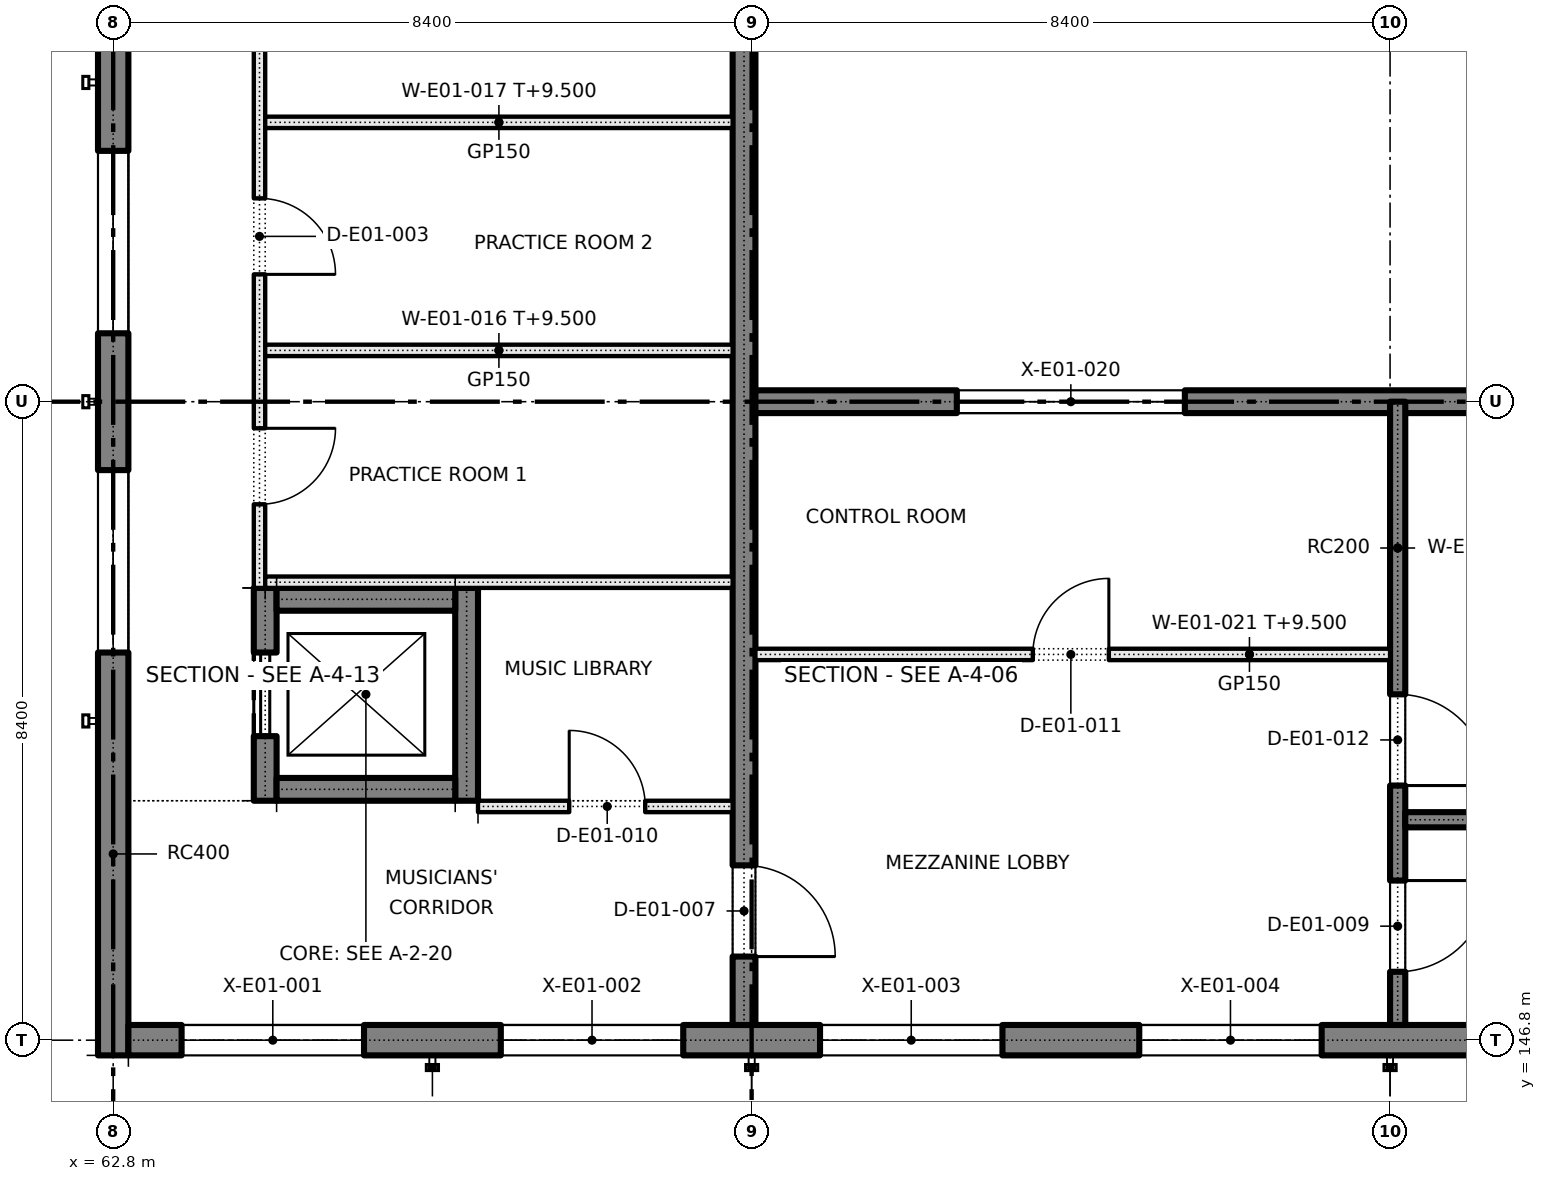
"""IFC4 building model, lengths in metres.
Left out: names, types, materials, properties, quantities, classifications, styles, units other than length and angle.
Written with IfcOpenShell. Run it as: python <this file> out.ifc"""

import sys

from ifc_helpers import new_model, si_unit, direction, frame, frame_2d, origin, place, context, subcontext, project, spatial, polyline, rectangle, outline, extrude, element, fill, save


model = new_model("IFC4")
c1 = context("Model", 3, precision=1e-05, world=origin(), true_north=direction((0.0, 1.0)))
c2 = subcontext(c1, "Body", "Model", "MODEL_VIEW")
j1 = project(units=[si_unit("LENGTHUNIT", "METRE"), si_unit("PLANEANGLEUNIT", "RADIAN")], contexts=[c1])
p1 = place(None, origin())
s1 = spatial("IfcSite", under=j1, at=p1, CompositionType="ELEMENT")
p2 = place(p1, origin())
s2 = spatial("IfcBuilding", under=s1, at=p2, CompositionType="ELEMENT")
p3 = place(p2, frame((0.0, 0.0, 5.4)))
s3 = spatial("IfcBuildingStorey", under=s2, at=p3, CompositionType="ELEMENT", Elevation=5.4)
p4 = place(p3, frame((62.8, 146.6, 0.0), z_axis=(0.0, 0.0, 1.0), x_axis=(0.0, 1.0, 0.0)))
e1 = element("IfcWall", 1, at=p4, inside=s3, PredefinedType="SOLIDWALL", context=c2, shape_type="SweptSolid", body=[
    extrude(rectangle(XDim=25.6, YDim=0.4, at=frame_2d((12.8, 0.0))), origin(), (0.0, 0.0, 1.0), 4.1),
])
p5 = place(p4, frame((5.3, 0.0, 0.9)))
e2 = element("IfcOpeningElement", 2, at=p5, cuts=e1, PredefinedType="OPENING", context=c2, shape_type="SweptSolid", body=[
    extrude(rectangle(XDim=2.4, YDim=2.4, at=frame_2d((1.2, 1.2))), frame((0.0, 0.21, 0.0), z_axis=(0.0, -1.0, 0.0), x_axis=(1.0, 0.0, 0.0)), (0.0, 0.0, 1.0), 0.42),
])
p6 = place(p4, frame((9.5, 0.0, 0.9)))
e3 = element("IfcOpeningElement", 3, at=p6, cuts=e1, PredefinedType="OPENING", context=c2, shape_type="SweptSolid", body=[
    extrude(rectangle(XDim=2.4, YDim=2.4, at=frame_2d((1.2, 1.2))), frame((0.0, 0.21, 0.0), z_axis=(0.0, -1.0, 0.0), x_axis=(1.0, 0.0, 0.0)), (0.0, 0.0, 1.0), 0.42),
])
p7 = place(p4, frame((13.7, 0.0, 0.9)))
e4 = element("IfcOpeningElement", 4, at=p7, cuts=e1, PredefinedType="OPENING", context=c2, shape_type="SweptSolid", body=[
    extrude(rectangle(XDim=2.4, YDim=2.4, at=frame_2d((1.2, 1.2))), frame((0.0, 0.21, 0.0), z_axis=(0.0, -1.0, 0.0), x_axis=(1.0, 0.0, 0.0)), (0.0, 0.0, 1.0), 0.42),
])
p8 = place(p4, frame((17.9, 0.0, 0.9)))
e5 = element("IfcOpeningElement", 5, at=p8, cuts=e1, PredefinedType="OPENING", context=c2, shape_type="SweptSolid", body=[
    extrude(rectangle(XDim=2.4, YDim=2.4, at=frame_2d((1.2, 1.2))), frame((0.0, 0.21, 0.0), z_axis=(0.0, -1.0, 0.0), x_axis=(1.0, 0.0, 0.0)), (0.0, 0.0, 1.0), 0.42),
])
p9 = place(p3, frame((63.0, 146.8, 0.0), z_axis=(0.0, 0.0, 1.0), x_axis=(1.0, 0.0, 0.0)))
e6 = element("IfcWall", 6, at=p9, inside=s3, PredefinedType="SOLIDWALL", context=c2, shape_type="SweptSolid", body=[
    extrude(outline(polyline([(0.0, 0.0), (24.8, 0.0), (24.8, 4.166), (22.802, 4.935), (20.721, 5.574), (18.641, 6.063), (16.561, 6.407), (14.48, 6.612), (12.4, 6.68), (10.32, 6.612), (8.239, 6.407), (6.159, 6.063), (4.079, 5.574), (1.998, 4.935), (0.0, 4.166), (0.0, 0.0)])), frame((0.0, 0.2, 0.0), z_axis=(0.0, -1.0, 0.0), x_axis=(1.0, 0.0, 0.0)), (0.0, 0.0, 1.0), 0.4),
])
p10 = place(p9, frame((0.7, 0.0, 0.9)))
e7 = element("IfcOpeningElement", 7, at=p10, cuts=e6, PredefinedType="OPENING", context=c2, shape_type="SweptSolid", body=[
    extrude(rectangle(XDim=2.4, YDim=2.4, at=frame_2d((1.2, 1.2))), frame((0.0, 0.21, 0.0), z_axis=(0.0, -1.0, 0.0), x_axis=(1.0, 0.0, 0.0)), (0.0, 0.0, 1.0), 0.42),
])
p11 = place(p9, frame((4.9, 0.0, 0.9)))
e8 = element("IfcOpeningElement", 8, at=p11, cuts=e6, PredefinedType="OPENING", context=c2, shape_type="SweptSolid", body=[
    extrude(rectangle(XDim=2.4, YDim=2.4, at=frame_2d((1.2, 1.2))), frame((0.0, 0.21, 0.0), z_axis=(0.0, -1.0, 0.0), x_axis=(1.0, 0.0, 0.0)), (0.0, 0.0, 1.0), 0.42),
])
p12 = place(p9, frame((9.1, 0.0, 0.9)))
e9 = element("IfcOpeningElement", 9, at=p12, cuts=e6, PredefinedType="OPENING", context=c2, shape_type="SweptSolid", body=[
    extrude(rectangle(XDim=2.4, YDim=2.4, at=frame_2d((1.2, 1.2))), frame((0.0, 0.21, 0.0), z_axis=(0.0, -1.0, 0.0), x_axis=(1.0, 0.0, 0.0)), (0.0, 0.0, 1.0), 0.42),
])
p13 = place(p9, frame((13.3, 0.0, 0.9)))
e10 = element("IfcOpeningElement", 10, at=p13, cuts=e6, PredefinedType="OPENING", context=c2, shape_type="SweptSolid", body=[
    extrude(rectangle(XDim=2.4, YDim=2.4, at=frame_2d((1.2, 1.2))), frame((0.0, 0.21, 0.0), z_axis=(0.0, -1.0, 0.0), x_axis=(1.0, 0.0, 0.0)), (0.0, 0.0, 1.0), 0.42),
])
p14 = place(p3, frame((71.1, 147.0, 0.0), z_axis=(0.0, 0.0, 1.0), x_axis=(0.0, 1.0, 0.0)))
e11 = element("IfcWall", 11, at=p14, inside=s3, PredefinedType="SOLIDWALL", context=c2, shape_type="SweptSolid", body=[
    extrude(rectangle(XDim=24.8, YDim=0.3, at=frame_2d((12.4, 0.0))), origin(), (0.0, 0.0, 1.0), 4.1),
])
p15 = place(p14, frame((0.9, 0.0, 0.0)))
e12 = element("IfcOpeningElement", 12, at=p15, cuts=e11, PredefinedType="OPENING", context=c2, shape_type="SweptSolid", body=[
    extrude(rectangle(XDim=1.2, YDim=2.1, at=frame_2d((0.6, 1.05))), frame((0.0, 0.16, 0.0), z_axis=(0.0, -1.0, 0.0), x_axis=(1.0, 0.0, 0.0)), (0.0, 0.0, 1.0), 0.32),
])
p16 = place(p3, frame((71.25, 155.2, 0.0), z_axis=(0.0, 0.0, 1.0), x_axis=(1.0, 0.0, 0.0)))
e13 = element("IfcWall", 13, at=p16, inside=s3, PredefinedType="SOLIDWALL", context=c2, shape_type="SweptSolid", body=[
    extrude(rectangle(XDim=16.55, YDim=0.3, at=frame_2d((8.275, 0.0))), origin(), (0.0, 0.0, 1.0), 4.1),
])
p17 = place(p16, frame((2.65, 0.0, 1.2)))
e14 = element("IfcOpeningElement", 14, at=p17, cuts=e13, PredefinedType="OPENING", context=c2, shape_type="SweptSolid", body=[
    extrude(rectangle(XDim=3.0, YDim=1.2, at=frame_2d((1.5, 0.6))), frame((0.0, 0.16, 0.0), z_axis=(0.0, -1.0, 0.0), x_axis=(1.0, 0.0, 0.0)), (0.0, 0.0, 1.0), 0.32),
])
p18 = place(p3, frame((79.7, 147.0, 0.0), z_axis=(0.0, 0.0, 1.0), x_axis=(0.0, 1.0, 0.0)))
e15 = element("IfcWall", 15, at=p18, inside=s3, PredefinedType="SOLIDWALL", context=c2, shape_type="SweptSolid", body=[
    extrude(rectangle(XDim=8.2, YDim=0.2, at=frame_2d((4.1, 0.0))), origin(), (0.0, 0.0, 1.0), 4.1),
])
p19 = place(p18, frame((0.7, 0.0, 0.0)))
e16 = element("IfcOpeningElement", 16, at=p19, cuts=e15, PredefinedType="OPENING", context=c2, shape_type="SweptSolid", body=[
    extrude(rectangle(XDim=1.2, YDim=2.1, at=frame_2d((0.6, 1.05))), frame((0.0, 0.11, 0.0), z_axis=(0.0, -1.0, 0.0), x_axis=(1.0, 0.0, 0.0)), (0.0, 0.0, 1.0), 0.22),
])
p20 = place(p18, frame((3.15, 0.0, 0.0)))
e17 = element("IfcOpeningElement", 17, at=p20, cuts=e15, PredefinedType="OPENING", context=c2, shape_type="SweptSolid", body=[
    extrude(rectangle(XDim=1.2, YDim=2.1, at=frame_2d((0.6, 1.05))), frame((0.0, 0.11, 0.0), z_axis=(0.0, -1.0, 0.0), x_axis=(1.0, 0.0, 0.0)), (0.0, 0.0, 1.0), 0.22),
])
p21 = place(p3, frame((79.8, 149.7, 0.0), z_axis=(0.0, 0.0, 1.0), x_axis=(1.0, 0.0, 0.0)))
e18 = element("IfcWall", 18, at=p21, inside=s3, PredefinedType="SOLIDWALL", context=c2, shape_type="SweptSolid", body=[
    extrude(rectangle(XDim=8.0, YDim=0.2, at=frame_2d((4.0, 0.0))), origin(), (0.0, 0.0, 1.0), 4.1),
])
p22 = place(p3, frame((64.8, 149.95, 0.0), z_axis=(0.0, 0.0, 1.0), x_axis=(0.0, 1.0, 0.0)))
e19 = element("IfcWall", 19, at=p22, inside=s3, PredefinedType="SOLIDWALL", context=c2, shape_type="SweptSolid", body=[
    extrude(rectangle(XDim=2.8, YDim=0.3, at=frame_2d((1.4, 0.0))), origin(), (0.0, 0.0, 1.0), 3.9),
])
p23 = place(p22, frame((0.85, 0.0, 0.0)))
e20 = element("IfcOpeningElement", 20, at=p23, cuts=e19, PredefinedType="OPENING", context=c2, shape_type="SweptSolid", body=[
    extrude(rectangle(XDim=1.1, YDim=2.1, at=frame_2d((0.55, 1.05))), frame((0.0, 0.16, 0.0), z_axis=(0.0, -1.0, 0.0), x_axis=(1.0, 0.0, 0.0)), (0.0, 0.0, 1.0), 0.32),
])
p24 = place(p3, frame((67.45, 149.95, 0.0), z_axis=(0.0, 0.0, 1.0), x_axis=(0.0, 1.0, 0.0)))
e21 = element("IfcWall", 21, at=p24, inside=s3, PredefinedType="SOLIDWALL", context=c2, shape_type="SweptSolid", body=[
    extrude(rectangle(XDim=2.8, YDim=0.3, at=frame_2d((1.4, 0.0))), origin(), (0.0, 0.0, 1.0), 3.9),
])
for number, where, z_axis, x_axis in (
    (22, (64.95, 150.1, 0.0), (0.0, 0.0, 1.0), (1.0, 0.0, 0.0)),
    (23, (64.95, 152.6, 0.0), (0.0, 0.0, 1.0), (1.0, 0.0, 0.0)),
):
    element("IfcWall", number, at=place(p3, frame(where, z_axis=z_axis, x_axis=x_axis)), inside=s3, PredefinedType="SOLIDWALL", context=c2, shape_type="SweptSolid", body=[
        extrude(rectangle(XDim=2.35, YDim=0.3, at=frame_2d((1.175, 0.0))), origin(), (0.0, 0.0, 1.0), 3.9),
    ])
p25 = place(p3, frame((64.725, 152.75, 0.0), z_axis=(0.0, 0.0, 1.0), x_axis=(0.0, 1.0, 0.0)))
e24 = element("IfcWall", 24, at=p25, inside=s3, PredefinedType="PARTITIONING", context=c2, shape_type="SweptSolid", body=[
    extrude(rectangle(XDim=16.25, YDim=0.15, at=frame_2d((8.125, 0.0))), origin(), (0.0, 0.0, 1.0), 4.1),
])
p26 = place(p25, frame((1.1, 0.0, 0.0)))
e25 = element("IfcOpeningElement", 25, at=p26, cuts=e24, PredefinedType="OPENING", context=c2, shape_type="SweptSolid", body=[
    extrude(rectangle(XDim=1.0, YDim=2.1, at=frame_2d((0.5, 1.05))), frame((0.0, 0.085, 0.0), z_axis=(0.0, -1.0, 0.0), x_axis=(1.0, 0.0, 0.0)), (0.0, 0.0, 1.0), 0.17),
])
p27 = place(p25, frame((4.125, 0.0, 0.0)))
e26 = element("IfcOpeningElement", 26, at=p27, cuts=e24, PredefinedType="OPENING", context=c2, shape_type="SweptSolid", body=[
    extrude(rectangle(XDim=1.0, YDim=2.1, at=frame_2d((0.5, 1.05))), frame((0.0, 0.085, 0.0), z_axis=(0.0, -1.0, 0.0), x_axis=(1.0, 0.0, 0.0)), (0.0, 0.0, 1.0), 0.17),
])
p28 = place(p25, frame((7.125, 0.0, 0.0)))
e27 = element("IfcOpeningElement", 27, at=p28, cuts=e24, PredefinedType="OPENING", context=c2, shape_type="SweptSolid", body=[
    extrude(rectangle(XDim=1.0, YDim=2.1, at=frame_2d((0.5, 1.05))), frame((0.0, 0.085, 0.0), z_axis=(0.0, -1.0, 0.0), x_axis=(1.0, 0.0, 0.0)), (0.0, 0.0, 1.0), 0.17),
])
p29 = place(p25, frame((10.125, 0.0, 0.0)))
e28 = element("IfcOpeningElement", 28, at=p29, cuts=e24, PredefinedType="OPENING", context=c2, shape_type="SweptSolid", body=[
    extrude(rectangle(XDim=1.0, YDim=2.1, at=frame_2d((0.5, 1.05))), frame((0.0, 0.085, 0.0), z_axis=(0.0, -1.0, 0.0), x_axis=(1.0, 0.0, 0.0)), (0.0, 0.0, 1.0), 0.17),
])
p30 = place(p25, frame((13.725, 0.0, 0.0)))
e29 = element("IfcOpeningElement", 29, at=p30, cuts=e24, PredefinedType="OPENING", context=c2, shape_type="SweptSolid", body=[
    extrude(rectangle(XDim=1.0, YDim=2.1, at=frame_2d((0.5, 1.05))), frame((0.0, 0.085, 0.0), z_axis=(0.0, -1.0, 0.0), x_axis=(1.0, 0.0, 0.0)), (0.0, 0.0, 1.0), 0.17),
])
for number, where, z_axis, x_axis in (
    (30, (64.8, 152.825, 0.0), (0.0, 0.0, 1.0), (1.0, 0.0, 0.0)),
    (31, (64.8, 155.875, 0.0), (0.0, 0.0, 1.0), (1.0, 0.0, 0.0)),
    (32, (64.8, 158.875, 0.0), (0.0, 0.0, 1.0), (1.0, 0.0, 0.0)),
):
    element("IfcWall", number, at=place(p3, frame(where, z_axis=z_axis, x_axis=x_axis)), inside=s3, PredefinedType="PARTITIONING", context=c2, shape_type="SweptSolid", body=[
        extrude(rectangle(XDim=6.15, YDim=0.15, at=frame_2d((3.075, 0.0))), origin(), (0.0, 0.0, 1.0), 4.1),
    ])
p31 = place(p3, frame((67.6, 149.875, 0.0), z_axis=(0.0, 0.0, 1.0), x_axis=(1.0, 0.0, 0.0)))
e33 = element("IfcWall", 33, at=p31, inside=s3, PredefinedType="PARTITIONING", context=c2, shape_type="SweptSolid", body=[
    extrude(rectangle(XDim=3.35, YDim=0.15, at=frame_2d((1.675, 0.0))), origin(), (0.0, 0.0, 1.0), 4.1),
])
p32 = place(p31, frame((1.2, 0.0, 0.0)))
e34 = element("IfcOpeningElement", 34, at=p32, cuts=e33, PredefinedType="OPENING", context=c2, shape_type="SweptSolid", body=[
    extrude(rectangle(XDim=1.0, YDim=2.1, at=frame_2d((0.5, 1.05))), frame((0.0, 0.085, 0.0), z_axis=(0.0, -1.0, 0.0), x_axis=(1.0, 0.0, 0.0)), (0.0, 0.0, 1.0), 0.17),
])
p33 = place(p3, frame((71.25, 151.875, 0.0), z_axis=(0.0, 0.0, 1.0), x_axis=(1.0, 0.0, 0.0)))
e35 = element("IfcWall", 35, at=p33, inside=s3, PredefinedType="PARTITIONING", context=c2, shape_type="SweptSolid", body=[
    extrude(rectangle(XDim=8.35, YDim=0.15, at=frame_2d((4.175, 0.0))), origin(), (0.0, 0.0, 1.0), 4.1),
])
p34 = place(p33, frame((3.65, 0.0, 0.0)))
e36 = element("IfcOpeningElement", 36, at=p34, cuts=e35, PredefinedType="OPENING", context=c2, shape_type="SweptSolid", body=[
    extrude(rectangle(XDim=1.0, YDim=2.1, at=frame_2d((0.5, 1.05))), frame((0.0, 0.085, 0.0), z_axis=(0.0, -1.0, 0.0), x_axis=(1.0, 0.0, 0.0)), (0.0, 0.0, 1.0), 0.17),
])
p35 = place(p23, origin())
e37 = element("IfcDoor", 37, at=p35, inside=s3, OperationType="SLIDING_TO_LEFT", PredefinedType="DOOR", context=c2, shape_type="SweptSolid", body=[
    extrude(rectangle(XDim=1.1, YDim=2.1, at=frame_2d((0.55, 1.05))), frame((0.0, 0.025, 0.0), z_axis=(0.0, -1.0, 0.0), x_axis=(1.0, 0.0, 0.0)), (0.0, 0.0, 1.0), 0.05),
])
fill(e20, e37)
p36 = place(p10, origin())
e38 = element("IfcWindow", 38, at=p36, inside=s3, PartitioningType="SINGLE_PANEL", PredefinedType="WINDOW", context=c2, shape_type="SweptSolid", body=[
    extrude(rectangle(XDim=2.4, YDim=2.4, at=frame_2d((1.2, 1.2))), frame((0.0, 0.03, 0.0), z_axis=(0.0, -1.0, 0.0), x_axis=(1.0, 0.0, 0.0)), (0.0, 0.0, 1.0), 0.06),
])
fill(e7, e38)
p37 = place(p11, origin())
e39 = element("IfcWindow", 39, at=p37, inside=s3, PartitioningType="SINGLE_PANEL", PredefinedType="WINDOW", context=c2, shape_type="SweptSolid", body=[
    extrude(rectangle(XDim=2.4, YDim=2.4, at=frame_2d((1.2, 1.2))), frame((0.0, 0.03, 0.0), z_axis=(0.0, -1.0, 0.0), x_axis=(1.0, 0.0, 0.0)), (0.0, 0.0, 1.0), 0.06),
])
fill(e8, e39)
p38 = place(p12, origin())
e40 = element("IfcWindow", 40, at=p38, inside=s3, PartitioningType="SINGLE_PANEL", PredefinedType="WINDOW", context=c2, shape_type="SweptSolid", body=[
    extrude(rectangle(XDim=2.4, YDim=2.4, at=frame_2d((1.2, 1.2))), frame((0.0, 0.03, 0.0), z_axis=(0.0, -1.0, 0.0), x_axis=(1.0, 0.0, 0.0)), (0.0, 0.0, 1.0), 0.06),
])
fill(e9, e40)
p39 = place(p13, origin())
e41 = element("IfcWindow", 41, at=p39, inside=s3, PartitioningType="SINGLE_PANEL", PredefinedType="WINDOW", context=c2, shape_type="SweptSolid", body=[
    extrude(rectangle(XDim=2.4, YDim=2.4, at=frame_2d((1.2, 1.2))), frame((0.0, 0.03, 0.0), z_axis=(0.0, -1.0, 0.0), x_axis=(1.0, 0.0, 0.0)), (0.0, 0.0, 1.0), 0.06),
])
fill(e10, e41)
p40 = place(p5, origin())
e42 = element("IfcWindow", 42, at=p40, inside=s3, PartitioningType="SINGLE_PANEL", PredefinedType="WINDOW", context=c2, shape_type="SweptSolid", body=[
    extrude(rectangle(XDim=2.4, YDim=2.4, at=frame_2d((1.2, 1.2))), frame((0.0, 0.03, 0.0), z_axis=(0.0, -1.0, 0.0), x_axis=(1.0, 0.0, 0.0)), (0.0, 0.0, 1.0), 0.06),
])
fill(e2, e42)
p41 = place(p6, origin())
e43 = element("IfcWindow", 43, at=p41, inside=s3, PartitioningType="SINGLE_PANEL", PredefinedType="WINDOW", context=c2, shape_type="SweptSolid", body=[
    extrude(rectangle(XDim=2.4, YDim=2.4, at=frame_2d((1.2, 1.2))), frame((0.0, 0.03, 0.0), z_axis=(0.0, -1.0, 0.0), x_axis=(1.0, 0.0, 0.0)), (0.0, 0.0, 1.0), 0.06),
])
fill(e3, e43)
p42 = place(p26, frame((1.0, 0.0, 0.0), z_axis=(0.0, 0.0, 1.0), x_axis=(-1.0, 0.0, 0.0)))
e44 = element("IfcDoor", 44, at=p42, inside=s3, OperationType="SINGLE_SWING_LEFT", PredefinedType="DOOR", context=c2, shape_type="SweptSolid", body=[
    extrude(rectangle(XDim=1.0, YDim=2.1, at=frame_2d((0.5, 1.05))), frame((0.0, 0.025, 0.0), z_axis=(0.0, -1.0, 0.0), x_axis=(1.0, 0.0, 0.0)), (0.0, 0.0, 1.0), 0.05),
])
fill(e25, e44)
p43 = place(p27, frame((1.0, 0.0, 0.0), z_axis=(0.0, 0.0, 1.0), x_axis=(-1.0, 0.0, 0.0)))
e45 = element("IfcDoor", 45, at=p43, inside=s3, OperationType="SINGLE_SWING_RIGHT", PredefinedType="DOOR", context=c2, shape_type="SweptSolid", body=[
    extrude(rectangle(XDim=1.0, YDim=2.1, at=frame_2d((0.5, 1.05))), frame((0.0, 0.025, 0.0), z_axis=(0.0, -1.0, 0.0), x_axis=(1.0, 0.0, 0.0)), (0.0, 0.0, 1.0), 0.05),
])
fill(e26, e45)
p44 = place(p15, frame((1.2, 0.0, 0.0), z_axis=(0.0, 0.0, 1.0), x_axis=(-1.0, 0.0, 0.0)))
e46 = element("IfcDoor", 46, at=p44, inside=s3, OperationType="SINGLE_SWING_RIGHT", PredefinedType="DOOR", context=c2, shape_type="SweptSolid", body=[
    extrude(rectangle(XDim=1.2, YDim=2.1, at=frame_2d((0.6, 1.05))), frame((0.0, 0.025, 0.0), z_axis=(0.0, -1.0, 0.0), x_axis=(1.0, 0.0, 0.0)), (0.0, 0.0, 1.0), 0.05),
])
fill(e12, e46)
p45 = place(p19, frame((1.2, 0.0, 0.0), z_axis=(0.0, 0.0, 1.0), x_axis=(-1.0, 0.0, 0.0)))
e47 = element("IfcDoor", 47, at=p45, inside=s3, OperationType="SINGLE_SWING_LEFT", PredefinedType="DOOR", context=c2, shape_type="SweptSolid", body=[
    extrude(rectangle(XDim=1.2, YDim=2.1, at=frame_2d((0.6, 1.05))), frame((0.0, 0.025, 0.0), z_axis=(0.0, -1.0, 0.0), x_axis=(1.0, 0.0, 0.0)), (0.0, 0.0, 1.0), 0.05),
])
fill(e16, e47)
p46 = place(p32, origin())
e48 = element("IfcDoor", 48, at=p46, inside=s3, OperationType="SINGLE_SWING_LEFT", PredefinedType="DOOR", context=c2, shape_type="SweptSolid", body=[
    extrude(rectangle(XDim=1.0, YDim=2.1, at=frame_2d((0.5, 1.05))), frame((0.0, 0.025, 0.0), z_axis=(0.0, -1.0, 0.0), x_axis=(1.0, 0.0, 0.0)), (0.0, 0.0, 1.0), 0.05),
])
fill(e34, e48)
p47 = place(p34, origin())
e49 = element("IfcDoor", 49, at=p47, inside=s3, OperationType="SINGLE_SWING_RIGHT", PredefinedType="DOOR", context=c2, shape_type="SweptSolid", body=[
    extrude(rectangle(XDim=1.0, YDim=2.1, at=frame_2d((0.5, 1.05))), frame((0.0, 0.025, 0.0), z_axis=(0.0, -1.0, 0.0), x_axis=(1.0, 0.0, 0.0)), (0.0, 0.0, 1.0), 0.05),
])
fill(e36, e49)
p48 = place(p20, frame((1.2, 0.0, 0.0), z_axis=(0.0, 0.0, 1.0), x_axis=(-1.0, 0.0, 0.0)))
e50 = element("IfcDoor", 50, at=p48, inside=s3, OperationType="SINGLE_SWING_RIGHT", PredefinedType="DOOR", context=c2, shape_type="SweptSolid", body=[
    extrude(rectangle(XDim=1.2, YDim=2.1, at=frame_2d((0.6, 1.05))), frame((0.0, 0.025, 0.0), z_axis=(0.0, -1.0, 0.0), x_axis=(1.0, 0.0, 0.0)), (0.0, 0.0, 1.0), 0.05),
])
fill(e17, e50)
p49 = place(p17, origin())
e51 = element("IfcWindow", 51, at=p49, inside=s3, PartitioningType="SINGLE_PANEL", PredefinedType="WINDOW", context=c2, shape_type="SweptSolid", body=[
    extrude(rectangle(XDim=3.0, YDim=1.2, at=frame_2d((1.5, 0.6))), frame((0.0, 0.03, 0.0), z_axis=(0.0, -1.0, 0.0), x_axis=(1.0, 0.0, 0.0)), (0.0, 0.0, 1.0), 0.06),
])
fill(e14, e51)
save(model, sys.argv[1])
